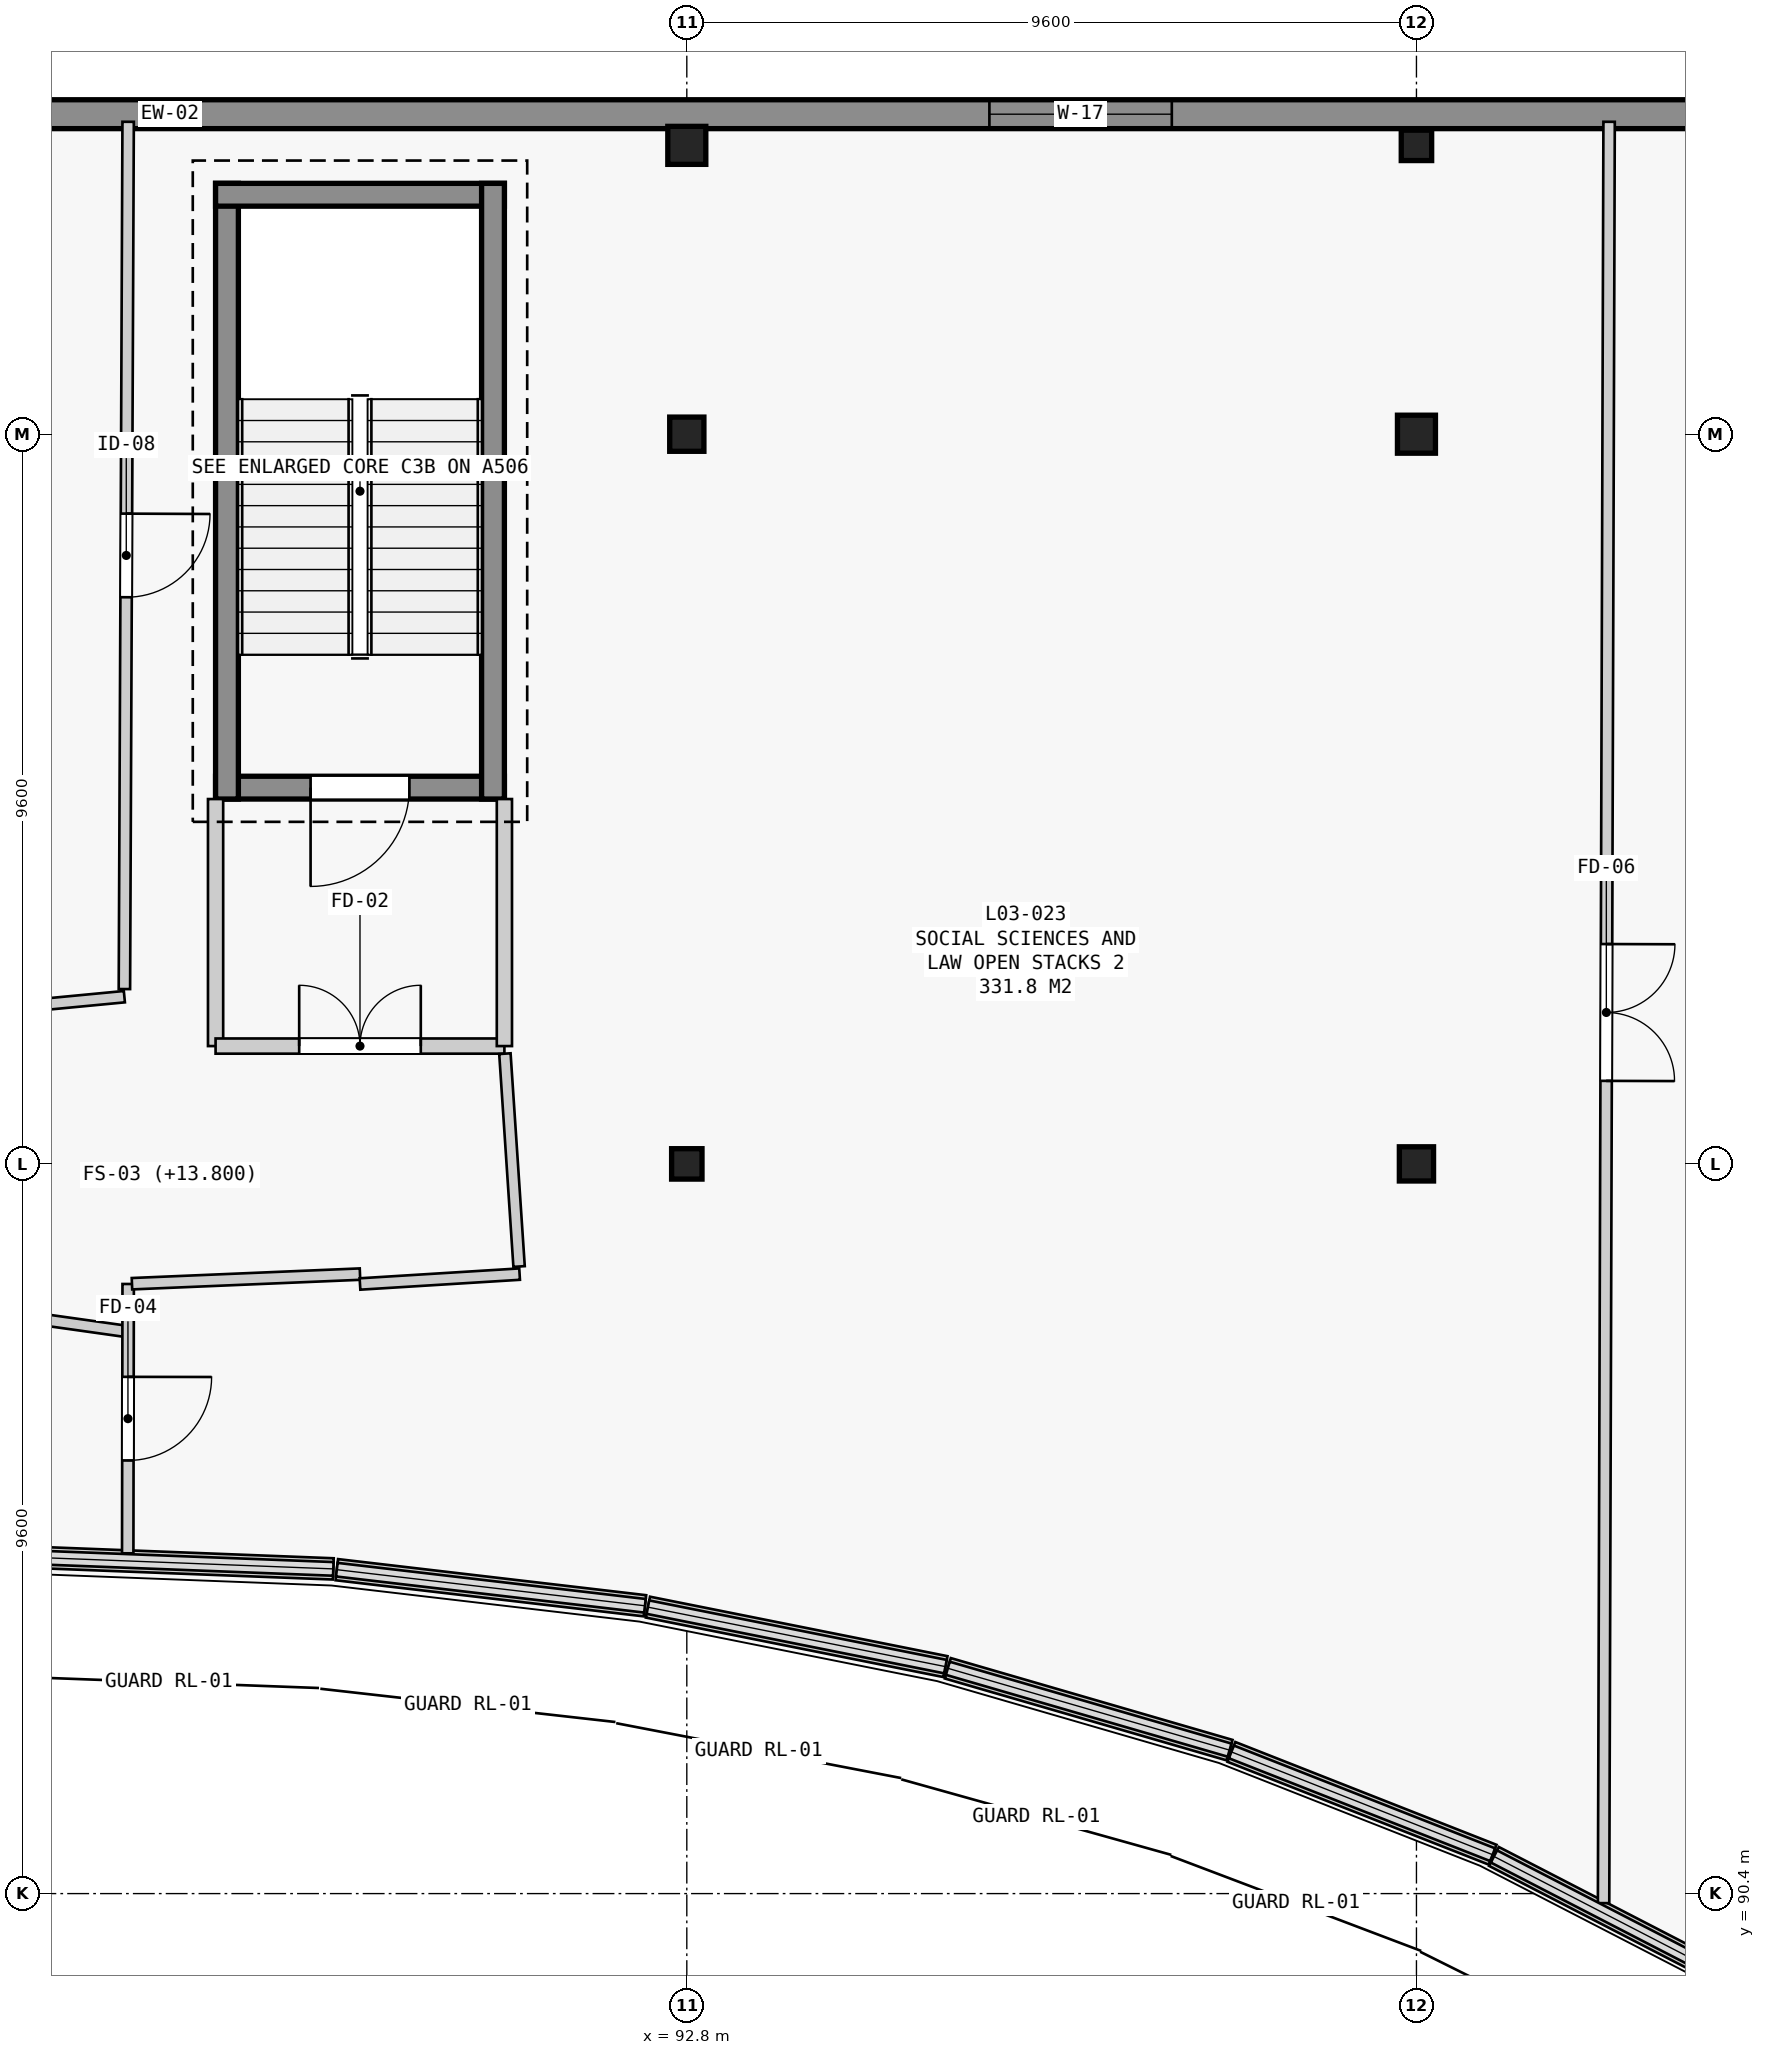
"""IFC4 building model, lengths in metres.
Left out: names, types, materials, properties, quantities, classifications, styles, units other than length and angle.
Written with IfcOpenShell. Run it as: python <this file> out.ifc"""

import sys

from ifc_helpers import new_model, si_unit, direction, frame, frame_2d, origin, origin_2d, place, context, subcontext, project, spatial, rectangle, extrude, element, fill, save


model = new_model("IFC4")
c1 = context("Model", 3, precision=1e-05, world=origin(), true_north=direction((0.0, 1.0)))
c2 = subcontext(c1, "Body", "Model", "MODEL_VIEW")
j1 = project(units=[si_unit("LENGTHUNIT", "METRE"), si_unit("PLANEANGLEUNIT", "RADIAN")], contexts=[c1])
p1 = place(None, origin())
s1 = spatial("IfcSite", under=j1, at=p1, CompositionType="ELEMENT")
p2 = place(p1, origin())
s2 = spatial("IfcBuilding", under=s1, at=p2, CompositionType="ELEMENT")
p3 = place(p2, frame((0.0, 0.0, 13.8)))
s3 = spatial("IfcBuildingStorey", under=s2, at=p3, CompositionType="ELEMENT", Elevation=13.8)
p4 = place(p3, frame((92.8, 100.0, 0.0), z_axis=(0.0, 0.0, 1.0), x_axis=(1.0, 0.0, 0.0)))
e1 = element("IfcColumn", 1, at=p4, inside=s3, PredefinedType="COLUMN", context=c2, shape_type="SweptSolid", body=[
    extrude(rectangle(XDim=0.4, YDim=0.4, at=origin_2d()), origin(), (0.0, 0.0, 1.0), 4.5),
])
p5 = place(p3, frame((92.8, 109.6, 0.0), z_axis=(0.0, 0.0, 1.0), x_axis=(1.0, 0.0, 0.0)))
e2 = element("IfcColumn", 2, at=p5, inside=s3, PredefinedType="COLUMN", context=c2, shape_type="SweptSolid", body=[
    extrude(rectangle(XDim=0.45, YDim=0.45, at=origin_2d()), origin(), (0.0, 0.0, 1.0), 4.5),
])
p6 = place(p3, frame((92.8, 113.4, 0.0), z_axis=(0.0, 0.0, 1.0), x_axis=(1.0, 0.0, 0.0)))
e3 = element("IfcColumn", 3, at=p6, inside=s3, PredefinedType="COLUMN", context=c2, shape_type="SweptSolid", body=[
    extrude(rectangle(XDim=0.5, YDim=0.5, at=origin_2d()), origin(), (0.0, 0.0, 1.0), 4.5),
])
p7 = place(p3, frame((102.4, 100.0, 0.0), z_axis=(0.0, 0.0, 1.0), x_axis=(1.0, 0.0, 0.0)))
e4 = element("IfcColumn", 4, at=p7, inside=s3, PredefinedType="COLUMN", context=c2, shape_type="SweptSolid", body=[
    extrude(rectangle(XDim=0.45, YDim=0.45, at=origin_2d()), origin(), (0.0, 0.0, 1.0), 4.5),
])
p8 = place(p3, frame((102.4, 109.6, 0.0), z_axis=(0.0, 0.0, 1.0), x_axis=(1.0, 0.0, 0.0)))
e5 = element("IfcColumn", 5, at=p8, inside=s3, PredefinedType="COLUMN", context=c2, shape_type="SweptSolid", body=[
    extrude(rectangle(XDim=0.5, YDim=0.5, at=origin_2d()), origin(), (0.0, 0.0, 1.0), 4.5),
])
p9 = place(p3, frame((102.4, 113.4, 0.0), z_axis=(0.0, 0.0, 1.0), x_axis=(1.0, 0.0, 0.0)))
e6 = element("IfcColumn", 6, at=p9, inside=s3, PredefinedType="COLUMN", context=c2, shape_type="SweptSolid", body=[
    extrude(rectangle(XDim=0.4, YDim=0.4, at=origin_2d()), origin(), (0.0, 0.0, 1.0), 4.5),
])
p10 = place(p3, frame((106.527, 89.283, 0.0), z_axis=(0.0, 0.0, 1.0), x_axis=(-0.888444407434, 0.458984242539, 0.0)))
e7 = element("IfcWall", 7, at=p10, inside=s3, PredefinedType="STANDARD", context=c2, shape_type="SweptSolid", body=[
    extrude(rectangle(XDim=3.498, YDim=0.28, at=frame_2d((1.749, 0.0))), origin(), (0.0, 0.0, 1.0), 0.72),
])
p11 = place(p3, frame((103.402, 90.912, 0.0), z_axis=(0.0, 0.0, 1.0), x_axis=(-0.930531980871, 0.366210639627, 0.0)))
e8 = element("IfcWall", 8, at=p11, inside=s3, PredefinedType="STANDARD", context=c2, shape_type="SweptSolid", body=[
    extrude(rectangle(XDim=3.693, YDim=0.28, at=frame_2d((1.847, 0.0))), origin(), (0.0, 0.0, 1.0), 0.72),
])
p12 = place(p3, frame((99.941, 92.287, 0.0), z_axis=(0.0, 0.0, 1.0), x_axis=(-0.96030470325, 0.278953180509, 0.0)))
e9 = element("IfcWall", 9, at=p12, inside=s3, PredefinedType="STANDARD", context=c2, shape_type="SweptSolid", body=[
    extrude(rectangle(XDim=3.861, YDim=0.28, at=frame_2d((1.93, 0.0))), origin(), (0.0, 0.0, 1.0), 0.72),
])
p13 = place(p3, frame((96.203, 93.386, 0.0), z_axis=(0.0, 0.0, 1.0), x_axis=(-0.980585380352, 0.196092610367, 0.0)))
e10 = element("IfcWall", 10, at=p13, inside=s3, PredefinedType="STANDARD", context=c2, shape_type="SweptSolid", body=[
    extrude(rectangle(XDim=3.991, YDim=0.28, at=frame_2d((1.996, 0.0))), origin(), (0.0, 0.0, 1.0), 0.72),
])
p14 = place(p3, frame((92.249, 94.187, 0.0), z_axis=(0.0, 0.0, 1.0), x_axis=(-0.993202765218, 0.116397023855, 0.0)))
e11 = element("IfcWall", 11, at=p14, inside=s3, PredefinedType="STANDARD", context=c2, shape_type="SweptSolid", body=[
    extrude(rectangle(XDim=4.082, YDim=0.28, at=frame_2d((2.041, 0.0))), origin(), (0.0, 0.0, 1.0), 0.72),
])
p15 = place(p3, frame((88.149, 94.672, 0.0), z_axis=(0.0, 0.0, 1.0), x_axis=(-0.999253817463, 0.038623934107, 0.0)))
e12 = element("IfcWall", 12, at=p15, inside=s3, PredefinedType="STANDARD", context=c2, shape_type="SweptSolid", body=[
    extrude(rectangle(XDim=4.128, YDim=0.28, at=frame_2d((2.064, 0.0))), origin(), (0.0, 0.0, 1.0), 0.72),
])
p16 = place(p3, frame((46.29, 113.81, 0.0), z_axis=(0.0, 0.0, 1.0), x_axis=(1.0, 0.0, 0.0)))
e13 = element("IfcWall", 13, at=p16, inside=s3, PredefinedType="STANDARD", context=c2, shape_type="SweptSolid", body=[
    extrude(rectangle(XDim=78.32, YDim=0.38, at=frame_2d((39.16, 0.0))), origin(), (0.0, 0.0, 1.0), 4.22),
])
p17 = place(p16, frame((23.329, 0.0, 1.05)))
e14 = element("IfcOpeningElement", 14, at=p17, cuts=e13, PredefinedType="OPENING", context=c2, shape_type="SweptSolid", body=[
    extrude(rectangle(XDim=1.8, YDim=2.5, at=frame_2d((0.9, 1.25))), frame((0.0, 0.2, 0.0), z_axis=(0.0, -1.0, 0.0), x_axis=(1.0, 0.0, 0.0)), (0.0, 0.0, 1.0), 0.4),
])
p18 = place(p16, frame((50.491, 0.0, 1.65)))
e15 = element("IfcOpeningElement", 15, at=p18, cuts=e13, PredefinedType="OPENING", context=c2, shape_type="SweptSolid", body=[
    extrude(rectangle(XDim=2.4, YDim=1.8, at=frame_2d((1.2, 0.9))), frame((0.0, 0.2, 0.0), z_axis=(0.0, -1.0, 0.0), x_axis=(1.0, 0.0, 0.0)), (0.0, 0.0, 1.0), 0.4),
])
p19 = place(p3, frame((90.4, 104.95, 0.0), z_axis=(0.0, 0.0, 1.0), x_axis=(-1.0, 0.0, 0.0)))
e16 = element("IfcWall", 16, at=p19, inside=s3, PredefinedType="SHEAR", context=c2, shape_type="SweptSolid", body=[
    extrude(rectangle(XDim=3.8, YDim=0.3, at=frame_2d((1.9, 0.0))), origin(), (0.0, 0.0, 1.0), 4.22),
])
p20 = place(p19, frame((1.25, 0.0, 0.0)))
e17 = element("IfcOpeningElement", 17, at=p20, cuts=e16, PredefinedType="OPENING", context=c2, shape_type="SweptSolid", body=[
    extrude(rectangle(XDim=1.3, YDim=2.2, at=frame_2d((0.65, 1.1))), frame((0.0, 0.16, 0.0), z_axis=(0.0, -1.0, 0.0), x_axis=(1.0, 0.0, 0.0)), (0.0, 0.0, 1.0), 0.32),
])
p21 = place(p3, frame((86.75, 104.8, 0.0), z_axis=(0.0, 0.0, 1.0), x_axis=(0.0, 1.0, 0.0)))
e18 = element("IfcWall", 18, at=p21, inside=s3, PredefinedType="SHEAR", context=c2, shape_type="SweptSolid", body=[
    extrude(rectangle(XDim=8.1, YDim=0.3, at=frame_2d((4.05, 0.0))), origin(), (0.0, 0.0, 1.0), 4.22),
])
p22 = place(p3, frame((86.6, 112.75, 0.0), z_axis=(0.0, 0.0, 1.0), x_axis=(1.0, 0.0, 0.0)))
e19 = element("IfcWall", 19, at=p22, inside=s3, PredefinedType="SHEAR", context=c2, shape_type="SweptSolid", body=[
    extrude(rectangle(XDim=3.8, YDim=0.3, at=frame_2d((1.9, 0.0))), origin(), (0.0, 0.0, 1.0), 4.22),
])
p23 = place(p3, frame((90.25, 112.9, 0.0), z_axis=(0.0, 0.0, 1.0), x_axis=(0.0, -1.0, 0.0)))
e20 = element("IfcWall", 20, at=p23, inside=s3, PredefinedType="SHEAR", context=c2, shape_type="SweptSolid", body=[
    extrude(rectangle(XDim=8.1, YDim=0.3, at=frame_2d((4.05, 0.0))), origin(), (0.0, 0.0, 1.0), 4.22),
])
p24 = place(p3, frame((86.6, 104.8, 0.0), z_axis=(0.0, 0.0, 1.0), x_axis=(0.0, -1.0, 0.0)))
e21 = element("IfcWall", 21, at=p24, inside=s3, PredefinedType="STANDARD", context=c2, shape_type="SweptSolid", body=[
    extrude(rectangle(XDim=3.25, YDim=0.2, at=frame_2d((1.625, 0.0))), origin(), (0.0, 0.0, 1.0), 4.22),
])
p25 = place(p3, frame((86.6, 101.55, 0.0), z_axis=(0.0, 0.0, 1.0), x_axis=(1.0, 0.0, 0.0)))
e22 = element("IfcWall", 22, at=p25, inside=s3, PredefinedType="STANDARD", context=c2, shape_type="SweptSolid", body=[
    extrude(rectangle(XDim=3.8, YDim=0.2, at=frame_2d((1.9, 0.0))), origin(), (0.0, 0.0, 1.0), 4.22),
])
p26 = place(p25, frame((1.1, 0.0, 0.0)))
e23 = element("IfcOpeningElement", 23, at=p26, cuts=e22, PredefinedType="OPENING", context=c2, shape_type="SweptSolid", body=[
    extrude(rectangle(XDim=1.6, YDim=2.2, at=frame_2d((0.8, 1.1))), frame((0.0, 0.11, 0.0), z_axis=(0.0, -1.0, 0.0), x_axis=(1.0, 0.0, 0.0)), (0.0, 0.0, 1.0), 0.22),
])
p27 = place(p3, frame((90.4, 101.55, 0.0), z_axis=(0.0, 0.0, 1.0), x_axis=(0.0, 1.0, 0.0)))
e24 = element("IfcWall", 24, at=p27, inside=s3, PredefinedType="STANDARD", context=c2, shape_type="SweptSolid", body=[
    extrude(rectangle(XDim=3.25, YDim=0.2, at=frame_2d((1.625, 0.0))), origin(), (0.0, 0.0, 1.0), 4.22),
])
p28 = place(p3, frame((85.4, 102.2, 0.0), z_axis=(0.0, 0.0, 1.0), x_axis=(-0.9954765855, -0.095007198261, 0.0)))
e25 = element("IfcWall", 25, at=p28, inside=s3, PredefinedType="PARTITIONING", context=c2, shape_type="SweptSolid", body=[
    extrude(rectangle(XDim=4.42, YDim=0.15, at=frame_2d((2.21, 0.0))), origin(), (0.0, 0.0, 1.0), 3.55),
])
p29 = place(p3, frame((85.45, 113.71, 0.0), z_axis=(0.0, 0.0, 1.0), x_axis=(-0.004322202058, -0.999990659241, 0.0)))
e26 = element("IfcWall", 26, at=p29, inside=s3, PredefinedType="PARTITIONING", context=c2, shape_type="SweptSolid", body=[
    extrude(rectangle(XDim=11.41, YDim=0.15, at=frame_2d((5.705, 0.0))), origin(), (0.0, 0.0, 1.0), 2.715),
])
p30 = place(p29, frame((5.155, 0.0, 0.0)))
e27 = element("IfcOpeningElement", 27, at=p30, cuts=e26, PredefinedType="OPENING", context=c2, shape_type="SweptSolid", body=[
    extrude(rectangle(XDim=1.1, YDim=2.2, at=frame_2d((0.55, 1.1))), frame((0.0, 0.085, 0.0), z_axis=(0.0, -1.0, 0.0), x_axis=(1.0, 0.0, 0.0)), (0.0, 0.0, 1.0), 0.17),
])
p31 = place(p3, frame((81.0, 98.42, 0.0), z_axis=(0.0, 0.0, 1.0), x_axis=(0.990221267466, -0.139505704034, 0.0)))
e28 = element("IfcWall", 28, at=p31, inside=s3, PredefinedType="PARTITIONING", context=c2, shape_type="SweptSolid", body=[
    extrude(rectangle(XDim=4.443, YDim=0.15, at=frame_2d((2.222, 0.0))), origin(), (0.0, 0.0, 1.0), 4.22),
])
p32 = place(p3, frame((85.45, 98.42, 0.0), z_axis=(0.0, 0.0, 1.0), x_axis=(-0.001653687534, -0.999998632658, 0.0)))
e29 = element("IfcWall", 29, at=p32, inside=s3, PredefinedType="PARTITIONING", context=c2, shape_type="SweptSolid", body=[
    extrude(rectangle(XDim=3.543, YDim=0.15, at=frame_2d((1.771, 0.0))), origin(), (0.0, 0.0, 1.0), 4.22),
])
p33 = place(p32, frame((1.222, 0.0, 0.0)))
e30 = element("IfcOpeningElement", 30, at=p33, cuts=e29, PredefinedType="OPENING", context=c2, shape_type="SweptSolid", body=[
    extrude(rectangle(XDim=1.1, YDim=2.15, at=frame_2d((0.55, 1.075))), frame((0.0, 0.085, 0.0), z_axis=(0.0, -1.0, 0.0), x_axis=(1.0, 0.0, 0.0)), (0.0, 0.0, 1.0), 0.17),
])
p34 = place(p3, frame((85.5, 98.424, 0.0), z_axis=(0.0, 0.0, 1.0), x_axis=(0.999112662633, 0.042117542256, 0.0)))
e31 = element("IfcWall", 31, at=p34, inside=s3, PredefinedType="PARTITIONING", context=c2, shape_type="SweptSolid", body=[
    extrude(rectangle(XDim=3.003, YDim=0.15, at=frame_2d((1.501, 0.0))), origin(), (0.0, 0.0, 1.0), 4.22),
])
p35 = place(p3, frame((88.5, 98.42, 0.0), z_axis=(0.0, 0.0, 1.0), x_axis=(0.998085844608, 0.061843728804, 0.0)))
e32 = element("IfcWall", 32, at=p35, inside=s3, PredefinedType="PARTITIONING", context=c2, shape_type="SweptSolid", body=[
    extrude(rectangle(XDim=2.104, YDim=0.15, at=frame_2d((1.052, 0.0))), origin(), (0.0, 0.0, 1.0), 4.22),
])
p36 = place(p3, frame((90.593, 98.65, 0.0), z_axis=(0.0, 0.0, 1.0), x_axis=(-0.066461272894, 0.997789005354, 0.0)))
e33 = element("IfcWall", 33, at=p36, inside=s3, PredefinedType="PARTITIONING", context=c2, shape_type="SweptSolid", body=[
    extrude(rectangle(XDim=2.806, YDim=0.15, at=frame_2d((1.403, 0.0))), origin(), (0.0, 0.0, 1.0), 3.55),
])
p37 = place(p3, frame((104.935, 113.71, 0.0), z_axis=(0.0, 0.0, 1.0), x_axis=(-0.003114827793, -0.999995148912, 0.0)))
e34 = element("IfcWall", 34, at=p37, inside=s3, PredefinedType="PARTITIONING", context=c2, shape_type="SweptSolid", body=[
    extrude(rectangle(XDim=23.436, YDim=0.15, at=frame_2d((11.718, 0.0))), origin(), (0.0, 0.0, 1.0), 3.43),
])
p38 = place(p37, frame((10.818, 0.0, 0.0)))
e35 = element("IfcOpeningElement", 35, at=p38, cuts=e34, PredefinedType="OPENING", context=c2, shape_type="SweptSolid", body=[
    extrude(rectangle(XDim=1.8, YDim=2.2, at=frame_2d((0.9, 1.1))), frame((0.0, 0.085, 0.0), z_axis=(0.0, -1.0, 0.0), x_axis=(1.0, 0.0, 0.0)), (0.0, 0.0, 1.0), 0.17),
])
p39 = place(p18, origin())
e36 = element("IfcWindow", 36, at=p39, inside=s3, PartitioningType="SINGLE_PANEL", PredefinedType="WINDOW", context=c2, shape_type="SweptSolid", body=[
    extrude(rectangle(XDim=2.4, YDim=1.8, at=frame_2d((1.2, 0.9))), frame((0.0, 0.03, 0.0), z_axis=(0.0, -1.0, 0.0), x_axis=(1.0, 0.0, 0.0)), (0.0, 0.0, 1.0), 0.06),
])
fill(e15, e36)
p40 = place(p20, origin())
e37 = element("IfcDoor", 37, at=p40, inside=s3, OperationType="SINGLE_SWING_RIGHT", PredefinedType="DOOR", context=c2, shape_type="SweptSolid", body=[
    extrude(rectangle(XDim=1.3, YDim=2.2, at=frame_2d((0.65, 1.1))), frame((0.0, 0.025, 0.0), z_axis=(0.0, -1.0, 0.0), x_axis=(1.0, 0.0, 0.0)), (0.0, 0.0, 1.0), 0.05),
])
fill(e17, e37)
p41 = place(p26, origin())
e38 = element("IfcDoor", 38, at=p41, inside=s3, OperationType="DOUBLE_DOOR_SINGLE_SWING", PredefinedType="DOOR", context=c2, shape_type="SweptSolid", body=[
    extrude(rectangle(XDim=1.6, YDim=2.2, at=frame_2d((0.8, 1.1))), frame((0.0, 0.025, 0.0), z_axis=(0.0, -1.0, 0.0), x_axis=(1.0, 0.0, 0.0)), (0.0, 0.0, 1.0), 0.05),
])
fill(e23, e38)
p42 = place(p30, origin())
e39 = element("IfcDoor", 39, at=p42, inside=s3, OperationType="SINGLE_SWING_LEFT", PredefinedType="DOOR", context=c2, shape_type="SweptSolid", body=[
    extrude(rectangle(XDim=1.1, YDim=2.2, at=frame_2d((0.55, 1.1))), frame((0.0, 0.025, 0.0), z_axis=(0.0, -1.0, 0.0), x_axis=(1.0, 0.0, 0.0)), (0.0, 0.0, 1.0), 0.05),
])
fill(e27, e39)
p43 = place(p33, origin())
e40 = element("IfcDoor", 40, at=p43, inside=s3, OperationType="SINGLE_SWING_LEFT", PredefinedType="DOOR", context=c2, shape_type="SweptSolid", body=[
    extrude(rectangle(XDim=1.1, YDim=2.15, at=frame_2d((0.55, 1.075))), frame((0.0, 0.025, 0.0), z_axis=(0.0, -1.0, 0.0), x_axis=(1.0, 0.0, 0.0)), (0.0, 0.0, 1.0), 0.05),
])
fill(e30, e40)
p44 = place(p38, origin())
e41 = element("IfcDoor", 41, at=p44, inside=s3, OperationType="DOUBLE_DOOR_SINGLE_SWING", PredefinedType="DOOR", context=c2, shape_type="SweptSolid", body=[
    extrude(rectangle(XDim=1.8, YDim=2.2, at=frame_2d((0.9, 1.1))), frame((0.0, 0.025, 0.0), z_axis=(0.0, -1.0, 0.0), x_axis=(1.0, 0.0, 0.0)), (0.0, 0.0, 1.0), 0.05),
])
fill(e35, e41)
save(model, sys.argv[1])
